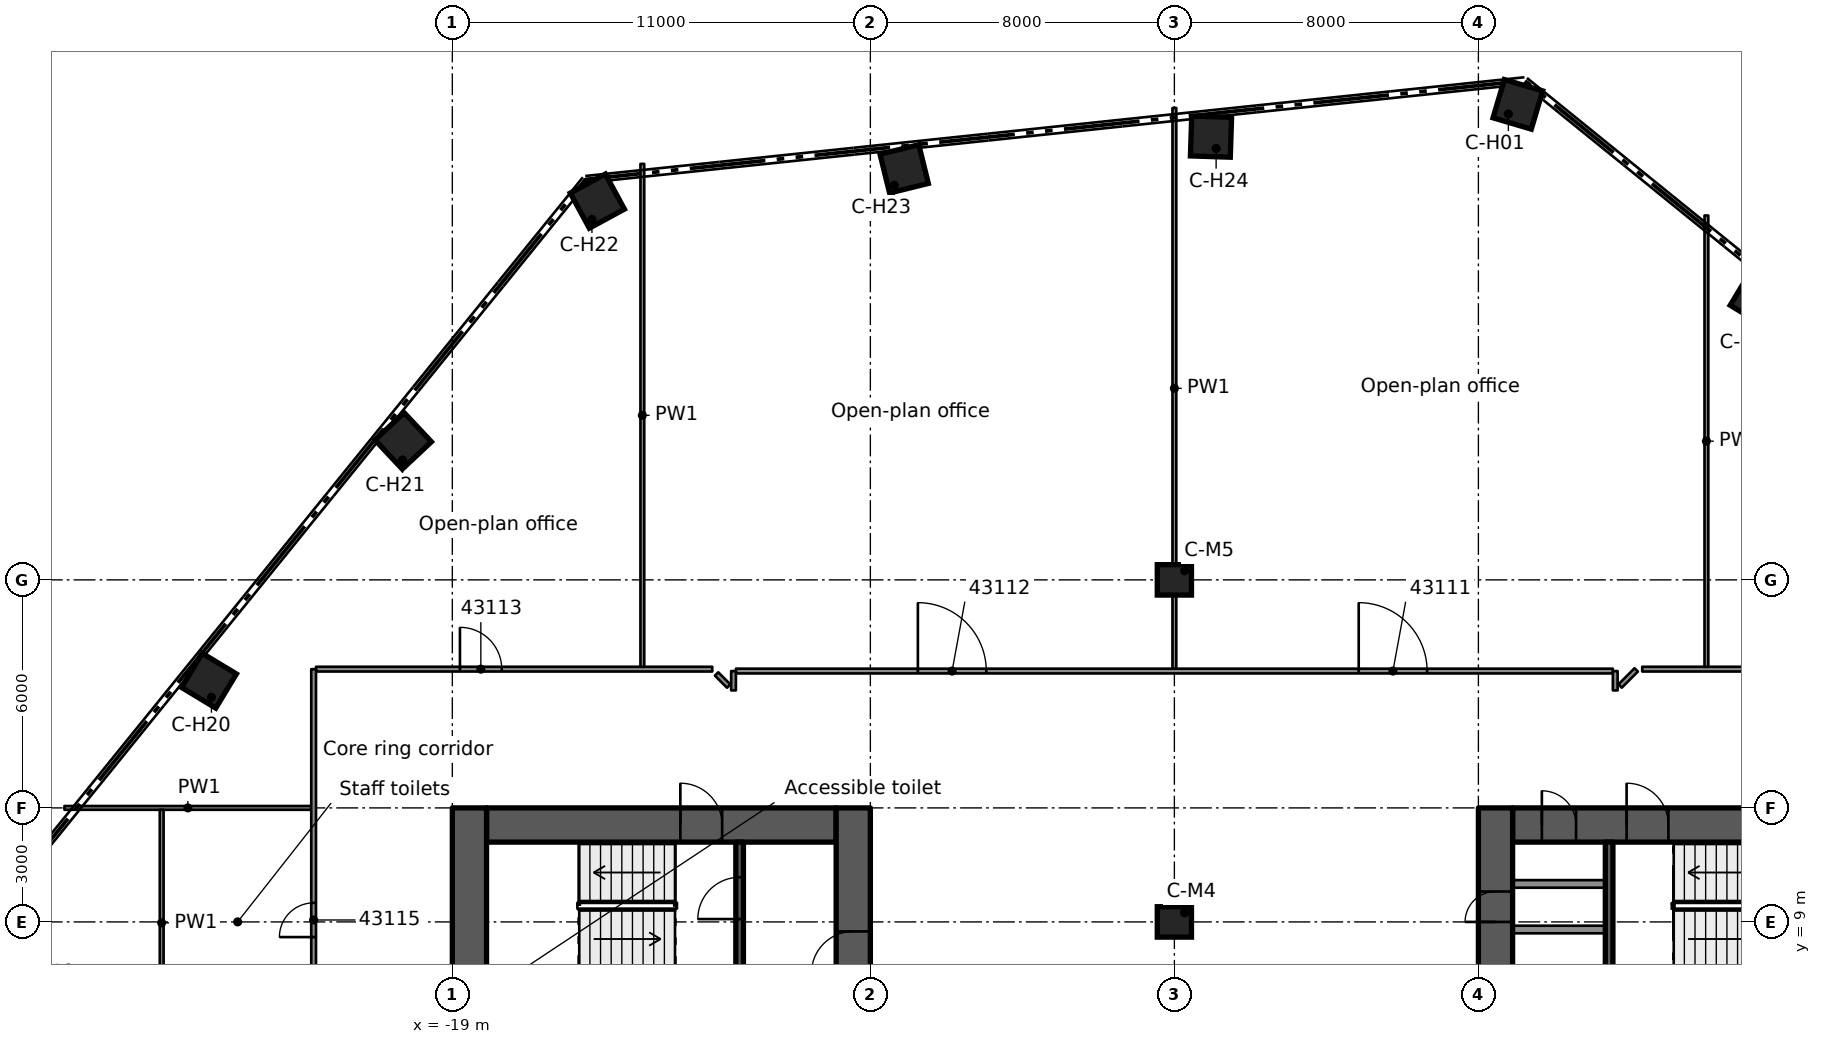
"""IFC4 building model, lengths in metres.
Left out: names, types, materials, properties, quantities, classifications, styles, units other than length and angle.
Written with IfcOpenShell. Run it as: python <this file> out.ifc"""

import sys

from ifc_helpers import new_model, si_unit, direction, frame, frame_2d, origin, origin_2d, place, context, subcontext, project, spatial, rectangle, extrude, element, fill, save


model = new_model("IFC4")
c1 = context("Model", 3, precision=1e-05, world=origin(), true_north=direction((0.0, 1.0)))
c2 = subcontext(c1, "Body", "Model", "MODEL_VIEW")
j1 = project(units=[si_unit("LENGTHUNIT", "METRE"), si_unit("PLANEANGLEUNIT", "RADIAN")], contexts=[c1])
p1 = place(None, origin())
s1 = spatial("IfcSite", under=j1, at=p1, CompositionType="ELEMENT")
p2 = place(p1, origin())
s2 = spatial("IfcBuilding", under=s1, at=p2, CompositionType="ELEMENT")
p3 = place(p2, frame((0.0, 0.0, 214.0)))
s3 = spatial("IfcBuildingStorey", under=s2, at=p3, CompositionType="ELEMENT", Elevation=214.0)
p4 = place(p3, frame((-18.1, 11.55, 0.0), z_axis=(0.0, 0.0, 1.0), x_axis=(1.0, 0.0, 0.0)))
e1 = element("IfcWall", 1, at=p4, inside=s3, PredefinedType="SHEAR", context=c2, shape_type="SweptSolid", body=[
    extrude(rectangle(XDim=9.2, YDim=0.9, at=frame_2d((4.6, 0.0))), origin(), (0.0, 0.0, 1.0), 3.5),
])
p5 = place(p4, frame((5.1, 0.0, 0.0)))
e2 = element("IfcOpeningElement", 2, at=p5, cuts=e1, PredefinedType="OPENING", context=c2, shape_type="SweptSolid", body=[
    extrude(rectangle(XDim=1.1, YDim=2.1, at=frame_2d((0.55, 1.05))), frame((0.0, 0.46, 0.0), z_axis=(0.0, -1.0, 0.0), x_axis=(1.0, 0.0, 0.0)), (0.0, 0.0, 1.0), 0.92),
])
p6 = place(p3, frame((-18.55, -12.0, 0.0), z_axis=(0.0, 0.0, 1.0), x_axis=(0.0, 1.0, 0.0)))
e3 = element("IfcWall", 3, at=p6, inside=s3, PredefinedType="SHEAR", context=c2, shape_type="SweptSolid", body=[
    extrude(rectangle(XDim=24.0, YDim=0.9, at=frame_2d((12.0, 0.0))), origin(), (0.0, 0.0, 1.0), 3.5),
])
p7 = place(p6, frame((10.1, 0.0, 0.0)))
e4 = element("IfcOpeningElement", 4, at=p7, cuts=e3, PredefinedType="OPENING", context=c2, shape_type="SweptSolid", body=[
    extrude(rectangle(XDim=1.8, YDim=2.1, at=frame_2d((0.9, 1.05))), frame((0.0, 0.46, 0.0), z_axis=(0.0, -1.0, 0.0), x_axis=(1.0, 0.0, 0.0)), (0.0, 0.0, 1.0), 0.92),
])
p8 = place(p3, frame((-8.45, -12.0, 0.0), z_axis=(0.0, 0.0, 1.0), x_axis=(0.0, 1.0, 0.0)))
e5 = element("IfcWall", 5, at=p8, inside=s3, PredefinedType="SHEAR", context=c2, shape_type="SweptSolid", body=[
    extrude(rectangle(XDim=24.0, YDim=0.9, at=frame_2d((12.0, 0.0))), origin(), (0.0, 0.0, 1.0), 3.5),
])
p9 = place(p8, frame((9.6, 0.0, 0.0)))
e6 = element("IfcOpeningElement", 6, at=p9, cuts=e5, PredefinedType="OPENING", context=c2, shape_type="SweptSolid", body=[
    extrude(rectangle(XDim=1.8, YDim=2.1, at=frame_2d((0.9, 1.05))), frame((0.0, 0.46, 0.0), z_axis=(0.0, -1.0, 0.0), x_axis=(1.0, 0.0, 0.0)), (0.0, 0.0, 1.0), 0.92),
])
p10 = place(p8, frame((19.65, 0.0, 0.0)))
e7 = element("IfcOpeningElement", 7, at=p10, cuts=e5, PredefinedType="OPENING", context=c2, shape_type="SweptSolid", body=[
    extrude(rectangle(XDim=1.1, YDim=2.1, at=frame_2d((0.55, 1.05))), frame((0.0, 0.46, 0.0), z_axis=(0.0, -1.0, 0.0), x_axis=(1.0, 0.0, 0.0)), (0.0, 0.0, 1.0), 0.92),
])
p11 = place(p8, frame((2.2, 0.0, 0.0)))
e8 = element("IfcOpeningElement", 8, at=p11, cuts=e5, PredefinedType="OPENING", context=c2, shape_type="SweptSolid", body=[
    extrude(rectangle(XDim=0.8, YDim=2.1, at=frame_2d((0.4, 1.05))), frame((0.0, 0.46, 0.0), z_axis=(0.0, -1.0, 0.0), x_axis=(1.0, 0.0, 0.0)), (0.0, 0.0, 1.0), 0.92),
])
p12 = place(p3, frame((8.9, 11.55, 0.0), z_axis=(0.0, 0.0, 1.0), x_axis=(1.0, 0.0, 0.0)))
e9 = element("IfcWall", 9, at=p12, inside=s3, PredefinedType="SHEAR", context=c2, shape_type="SweptSolid", body=[
    extrude(rectangle(XDim=9.2, YDim=0.9, at=frame_2d((4.6, 0.0))), origin(), (0.0, 0.0, 1.0), 3.5),
])
p13 = place(p12, frame((3.0, 0.0, 0.0)))
e10 = element("IfcOpeningElement", 10, at=p13, cuts=e9, PredefinedType="OPENING", context=c2, shape_type="SweptSolid", body=[
    extrude(rectangle(XDim=1.1, YDim=2.1, at=frame_2d((0.55, 1.05))), frame((0.0, 0.46, 0.0), z_axis=(0.0, -1.0, 0.0), x_axis=(1.0, 0.0, 0.0)), (0.0, 0.0, 1.0), 0.92),
])
p14 = place(p12, frame((0.77, 0.0, 0.0)))
e11 = element("IfcOpeningElement", 11, at=p14, cuts=e9, PredefinedType="OPENING", context=c2, shape_type="SweptSolid", body=[
    extrude(rectangle(XDim=0.9, YDim=2.1, at=frame_2d((0.45, 1.05))), frame((0.0, 0.46, 0.0), z_axis=(0.0, -1.0, 0.0), x_axis=(1.0, 0.0, 0.0)), (0.0, 0.0, 1.0), 0.92),
])
p15 = place(p3, frame((8.45, -12.0, 0.0), z_axis=(0.0, 0.0, 1.0), x_axis=(0.0, 1.0, 0.0)))
e12 = element("IfcWall", 12, at=p15, inside=s3, PredefinedType="SHEAR", context=c2, shape_type="SweptSolid", body=[
    extrude(rectangle(XDim=24.0, YDim=0.9, at=frame_2d((12.0, 0.0))), origin(), (0.0, 0.0, 1.0), 3.5),
])
p16 = place(p15, frame((12.6, 0.0, 0.0)))
e13 = element("IfcOpeningElement", 13, at=p16, cuts=e12, PredefinedType="OPENING", context=c2, shape_type="SweptSolid", body=[
    extrude(rectangle(XDim=1.8, YDim=2.1, at=frame_2d((0.9, 1.05))), frame((0.0, 0.46, 0.0), z_axis=(0.0, -1.0, 0.0), x_axis=(1.0, 0.0, 0.0)), (0.0, 0.0, 1.0), 0.92),
])
p17 = place(p15, frame((3.25, 0.0, 0.0)))
e14 = element("IfcOpeningElement", 14, at=p17, cuts=e12, PredefinedType="OPENING", context=c2, shape_type="SweptSolid", body=[
    extrude(rectangle(XDim=1.1, YDim=2.1, at=frame_2d((0.55, 1.05))), frame((0.0, 0.46, 0.0), z_axis=(0.0, -1.0, 0.0), x_axis=(1.0, 0.0, 0.0)), (0.0, 0.0, 1.0), 0.92),
])
p18 = place(p15, frame((21.0, 0.0, 0.0)))
e15 = element("IfcOpeningElement", 15, at=p18, cuts=e12, PredefinedType="OPENING", context=c2, shape_type="SweptSolid", body=[
    extrude(rectangle(XDim=0.8, YDim=2.1, at=frame_2d((0.4, 1.05))), frame((0.0, 0.46, 0.0), z_axis=(0.0, -1.0, 0.0), x_axis=(1.0, 0.0, 0.0)), (0.0, 0.0, 1.0), 0.92),
])
for number, where, z_axis, x_axis in (
    (16, (9.038, 30.512, 0.0), (0.0, 0.0, 1.0), (0.284, 0.959, 0.0)),
    (17, (15.347, 25.403, 0.0), (0.0, 0.0, 1.0), (0.517, 0.856, 0.0)),
    (18, (-25.403, 15.347, 0.0), (0.0, 0.0, 1.0), (-0.856, 0.517, 0.0)),
    (19, (-20.293, 21.657, 0.0), (0.0, 0.0, 1.0), (-0.684, 0.73, 0.0)),
    (20, (-15.184, 27.966, 0.0), (0.0, 0.0, 1.0), (-0.477, 0.879, 0.0)),
    (21, (-7.11, 28.815, 0.0), (0.0, 0.0, 1.0), (-0.24, 0.971, 0.0)),
    (22, (0.964, 29.663, 0.0), (0.0, 0.0, 1.0), (0.032, 0.999, 0.0)),
):
    element("IfcColumn", number, at=place(p3, frame(where, z_axis=z_axis, x_axis=x_axis)), inside=s3, PredefinedType="COLUMN", context=c2, shape_type="SweptSolid", body=[
        extrude(rectangle(XDim=1.05, YDim=1.05, at=origin_2d()), origin(), (0.0, 0.0, 1.0), 3.5),
    ])
for number, where, z_axis, x_axis in (
    (23, (0.0, 9.0, 0.0), (0.0, 0.0, 1.0), (1.0, 0.0, 0.0)),
    (24, (0.0, 18.0, 0.0), (0.0, 0.0, 1.0), (1.0, 0.0, 0.0)),
):
    element("IfcColumn", number, at=place(p3, frame(where, z_axis=z_axis, x_axis=x_axis)), inside=s3, PredefinedType="COLUMN", context=c2, shape_type="SweptSolid", body=[
        extrude(rectangle(XDim=0.9, YDim=0.8, at=origin_2d()), origin(), (0.0, 0.0, 1.0), 3.5),
    ])
p19 = place(p3, frame((-11.44, 6.975, 0.0), z_axis=(0.0, 0.0, 1.0), x_axis=(0.0, 1.0, 0.0)))
e25 = element("IfcWall", 25, at=p19, inside=s3, PredefinedType="SOLIDWALL", context=c2, shape_type="SweptSolid", body=[
    extrude(rectangle(XDim=4.125, YDim=0.2, at=frame_2d((2.062, 0.0))), origin(), (0.0, 0.0, 1.0), 3.08),
])
p20 = place(p19, frame((2.1, 0.0, 0.0)))
e26 = element("IfcOpeningElement", 26, at=p20, cuts=e25, PredefinedType="OPENING", context=c2, shape_type="SweptSolid", body=[
    extrude(rectangle(XDim=1.1, YDim=2.1, at=frame_2d((0.55, 1.05))), frame((0.0, 0.11, 0.0), z_axis=(0.0, -1.0, 0.0), x_axis=(1.0, 0.0, 0.0)), (0.0, 0.0, 1.0), 0.22),
])
p21 = place(p3, frame((11.44, 11.1, 0.0), z_axis=(0.0, 0.0, 1.0), x_axis=(0.0, -1.0, 0.0)))
e27 = element("IfcWall", 27, at=p21, inside=s3, PredefinedType="SOLIDWALL", context=c2, shape_type="SweptSolid", body=[
    extrude(rectangle(XDim=4.125, YDim=0.2, at=frame_2d((2.062, 0.0))), origin(), (0.0, 0.0, 1.0), 3.08),
])
for number, where, z_axis, x_axis in (
    (28, (8.9, 10.0, 0.0), (0.0, 0.0, 1.0), (1.0, 0.0, 0.0)),
    (29, (8.9, 8.8, 0.0), (0.0, 0.0, 1.0), (1.0, 0.0, 0.0)),
):
    element("IfcWall", number, at=place(p3, frame(where, z_axis=z_axis, x_axis=x_axis)), inside=s3, PredefinedType="PARTITIONING", context=c2, shape_type="SweptSolid", body=[
        extrude(rectangle(XDim=2.44, YDim=0.2, at=frame_2d((1.22, 0.0))), origin(), (0.0, 0.0, 1.0), 3.08),
    ])
p22 = place(p3, frame((-12.046, 15.524, 0.0), z_axis=(0.0, 0.0, 1.0), x_axis=(0.707106781187, -0.707106781187, 0.0)))
e30 = element("IfcWall", 30, at=p22, inside=s3, PredefinedType="PARTITIONING", context=c2, shape_type="SweptSolid", body=[
    extrude(rectangle(XDim=0.449, YDim=0.125, at=frame_2d((0.225, 0.0))), origin(), (0.0, 0.0, 1.0), 3.06),
])
p23 = place(p3, frame((-29.207, 12.0, 0.0), z_axis=(0.0, 0.0, 1.0), x_axis=(1.0, 0.0, 0.0)))
e31 = element("IfcWall", 31, at=p23, inside=s3, PredefinedType="PARTITIONING", context=c2, shape_type="SweptSolid", body=[
    extrude(rectangle(XDim=6.495, YDim=0.1, at=frame_2d((3.248, 0.0))), origin(), (0.0, 0.0, 1.0), 3.06),
])
p24 = place(p3, frame((-11.537, 15.601, 0.0), z_axis=(0.0, 0.0, 1.0), x_axis=(1.0, 0.0, 0.0)))
e32 = element("IfcWall", 32, at=p24, inside=s3, PredefinedType="PARTITIONING", context=c2, shape_type="SweptSolid", body=[
    extrude(rectangle(XDim=23.074, YDim=0.125, at=frame_2d((11.537, 0.0))), origin(), (0.0, 0.0, 1.0), 3.06),
])
p25 = place(p24, frame((16.387, 0.0, 0.0)))
e33 = element("IfcOpeningElement", 33, at=p25, cuts=e32, PredefinedType="OPENING", context=c2, shape_type="SweptSolid", body=[
    extrude(rectangle(XDim=1.8, YDim=2.1, at=frame_2d((0.9, 1.05))), frame((0.0, 0.073, 0.0), z_axis=(0.0, -1.0, 0.0), x_axis=(1.0, 0.0, 0.0)), (0.0, 0.0, 1.0), 0.145),
])
p26 = place(p24, frame((4.788, 0.0, 0.0)))
e34 = element("IfcOpeningElement", 34, at=p26, cuts=e32, PredefinedType="OPENING", context=c2, shape_type="SweptSolid", body=[
    extrude(rectangle(XDim=1.8, YDim=2.1, at=frame_2d((0.9, 1.05))), frame((0.0, 0.073, 0.0), z_axis=(0.0, -1.0, 0.0), x_axis=(1.0, 0.0, 0.0)), (0.0, 0.0, 1.0), 0.145),
])
p27 = place(p3, frame((-22.587, 15.651, 0.0), z_axis=(0.0, 0.0, 1.0), x_axis=(1.0, 0.0, 0.0)))
e35 = element("IfcWall", 35, at=p27, inside=s3, PredefinedType="PARTITIONING", context=c2, shape_type="SweptSolid", body=[
    extrude(rectangle(XDim=10.427, YDim=0.125, at=frame_2d((5.213, 0.0))), origin(), (0.0, 0.0, 1.0), 3.06),
])
p28 = place(p27, frame((3.788, 0.0, 0.0)))
e36 = element("IfcOpeningElement", 36, at=p28, cuts=e35, PredefinedType="OPENING", context=c2, shape_type="SweptSolid", body=[
    extrude(rectangle(XDim=1.1, YDim=2.1, at=frame_2d((0.55, 1.05))), frame((0.0, 0.073, 0.0), z_axis=(0.0, -1.0, 0.0), x_axis=(1.0, 0.0, 0.0)), (0.0, 0.0, 1.0), 0.145),
])
p29 = place(p3, frame((12.311, 15.651, 0.0), z_axis=(0.0, 0.0, 1.0), x_axis=(1.0, 0.0, 0.0)))
e37 = element("IfcWall", 37, at=p29, inside=s3, PredefinedType="PARTITIONING", context=c2, shape_type="SweptSolid", body=[
    extrude(rectangle(XDim=10.276, YDim=0.125, at=frame_2d((5.138, 0.0))), origin(), (0.0, 0.0, 1.0), 3.06),
])
p30 = place(p29, frame((5.039, 0.0, 0.0)))
e38 = element("IfcOpeningElement", 38, at=p30, cuts=e37, PredefinedType="OPENING", context=c2, shape_type="SweptSolid", body=[
    extrude(rectangle(XDim=1.8, YDim=2.1, at=frame_2d((0.9, 1.05))), frame((0.0, 0.073, 0.0), z_axis=(0.0, -1.0, 0.0), x_axis=(1.0, 0.0, 0.0)), (0.0, 0.0, 1.0), 0.145),
])
p31 = place(p3, frame((11.729, 15.207, 0.0), z_axis=(0.0, 0.0, 1.0), x_axis=(0.707106781187, 0.707106781187, 0.0)))
e39 = element("IfcWall", 39, at=p31, inside=s3, PredefinedType="PARTITIONING", context=c2, shape_type="SweptSolid", body=[
    extrude(rectangle(XDim=0.6, YDim=0.125, at=frame_2d((0.3, 0.0))), origin(), (0.0, 0.0, 1.0), 3.06),
])
p32 = place(p3, frame((-11.601, 15.092, 0.0), z_axis=(0.0, 0.0, 1.0), x_axis=(0.00192214926, 0.999998152669, 0.0)))
e40 = element("IfcWall", 40, at=p32, inside=s3, PredefinedType="PARTITIONING", context=c2, shape_type="SweptSolid", body=[
    extrude(rectangle(XDim=0.508, YDim=0.125, at=frame_2d((0.254, 0.0))), origin(), (0.0, 0.0, 1.0), 3.06),
])
p33 = place(p3, frame((14.0, 15.713, 0.0), z_axis=(0.0, 0.0, 1.0), x_axis=(0.0, 1.0, 0.0)))
e41 = element("IfcWall", 41, at=p33, inside=s3, PredefinedType="PARTITIONING", context=c2, shape_type="SweptSolid", body=[
    extrude(rectangle(XDim=11.874, YDim=0.1, at=frame_2d((5.937, 0.0))), origin(), (0.0, 0.0, 1.0), 3.06),
])
p34 = place(p3, frame((11.601, 15.092, 0.0), z_axis=(0.0, 0.0, 1.0), x_axis=(0.0, 1.0, 0.0)))
e42 = element("IfcWall", 42, at=p34, inside=s3, PredefinedType="PARTITIONING", context=c2, shape_type="SweptSolid", body=[
    extrude(rectangle(XDim=0.508, YDim=0.125, at=frame_2d((0.254, 0.0))), origin(), (0.0, 0.0, 1.0), 3.06),
])
p35 = place(p3, frame((0.0, 15.664, 0.0), z_axis=(0.0, 0.0, 1.0), x_axis=(0.0, 1.0, 0.0)))
e43 = element("IfcWall", 43, at=p35, inside=s3, PredefinedType="PARTITIONING", context=c2, shape_type="SweptSolid", body=[
    extrude(rectangle(XDim=14.753, YDim=0.1, at=frame_2d((7.376, 0.0))), origin(), (0.0, 0.0, 1.0), 3.06),
])
p36 = place(p3, frame((-14.0, 15.713, 0.0), z_axis=(0.0, 0.0, 1.0), x_axis=(0.0, 1.0, 0.0)))
e44 = element("IfcWall", 44, at=p36, inside=s3, PredefinedType="PARTITIONING", context=c2, shape_type="SweptSolid", body=[
    extrude(rectangle(XDim=13.233, YDim=0.1, at=frame_2d((6.617, 0.0))), origin(), (0.0, 0.0, 1.0), 3.06),
])
p37 = place(p3, frame((-22.65, -15.651, 0.0), z_axis=(0.0, 0.0, 1.0), x_axis=(0.0, 1.0, 0.0)))
e45 = element("IfcWall", 45, at=p37, inside=s3, PredefinedType="PARTITIONING", context=c2, shape_type="SweptSolid", body=[
    extrude(rectangle(XDim=31.302, YDim=0.125, at=frame_2d((15.651, 0.0))), origin(), (0.0, 0.0, 1.0), 3.06),
])
p38 = place(p37, frame((0.85, 0.0, 0.0)))
e46 = element("IfcOpeningElement", 46, at=p38, cuts=e45, PredefinedType="OPENING", context=c2, shape_type="SweptSolid", body=[
    extrude(rectangle(XDim=1.8, YDim=2.1, at=frame_2d((0.9, 1.05))), frame((0.0, 0.073, 0.0), z_axis=(0.0, -1.0, 0.0), x_axis=(1.0, 0.0, 0.0)), (0.0, 0.0, 1.0), 0.145),
])
p39 = place(p37, frame((8.751, 0.0, 0.0)))
e47 = element("IfcOpeningElement", 47, at=p39, cuts=e45, PredefinedType="OPENING", context=c2, shape_type="SweptSolid", body=[
    extrude(rectangle(XDim=1.8, YDim=2.1, at=frame_2d((0.9, 1.05))), frame((0.0, 0.073, 0.0), z_axis=(0.0, -1.0, 0.0), x_axis=(1.0, 0.0, 0.0)), (0.0, 0.0, 1.0), 0.145),
])
p40 = place(p37, frame((24.252, 0.0, 0.0)))
e48 = element("IfcOpeningElement", 48, at=p40, cuts=e45, PredefinedType="OPENING", context=c2, shape_type="SweptSolid", body=[
    extrude(rectangle(XDim=0.9, YDim=2.1, at=frame_2d((0.45, 1.05))), frame((0.0, 0.073, 0.0), z_axis=(0.0, -1.0, 0.0), x_axis=(1.0, 0.0, 0.0)), (0.0, 0.0, 1.0), 0.145),
])
p41 = place(p37, frame((18.003, 0.0, 0.0)))
e49 = element("IfcOpeningElement", 49, at=p41, cuts=e45, PredefinedType="OPENING", context=c2, shape_type="SweptSolid", body=[
    extrude(rectangle(XDim=1.1, YDim=2.1, at=frame_2d((0.55, 1.05))), frame((0.0, 0.073, 0.0), z_axis=(0.0, -1.0, 0.0), x_axis=(1.0, 0.0, 0.0)), (0.0, 0.0, 1.0), 0.145),
])
p42 = place(p3, frame((-26.648, 6.001, 0.0), z_axis=(0.0, 0.0, 1.0), x_axis=(0.0, 1.0, 0.0)))
e50 = element("IfcWall", 50, at=p42, inside=s3, PredefinedType="PARTITIONING", context=c2, shape_type="SweptSolid", body=[
    extrude(rectangle(XDim=5.949, YDim=0.1, at=frame_2d((2.975, 0.0))), origin(), (0.0, 0.0, 1.0), 3.06),
])
p43 = place(p10, origin())
e51 = element("IfcDoor", 51, at=p43, inside=s3, OperationType="SINGLE_SWING_RIGHT", PredefinedType="DOOR", context=c2, shape_type="SweptSolid", body=[
    extrude(rectangle(XDim=1.1, YDim=2.1, at=frame_2d((0.55, 1.05))), frame((0.0, 0.025, 0.0), z_axis=(0.0, -1.0, 0.0), x_axis=(1.0, 0.0, 0.0)), (0.0, 0.0, 1.0), 0.05),
])
fill(e7, e51)
p44 = place(p5, origin())
e52 = element("IfcDoor", 52, at=p44, inside=s3, OperationType="SINGLE_SWING_RIGHT", PredefinedType="DOOR", context=c2, shape_type="SweptSolid", body=[
    extrude(rectangle(XDim=1.1, YDim=2.1, at=frame_2d((0.55, 1.05))), frame((0.0, 0.025, 0.0), z_axis=(0.0, -1.0, 0.0), x_axis=(1.0, 0.0, 0.0)), (0.0, 0.0, 1.0), 0.05),
])
fill(e2, e52)
p45 = place(p20, origin())
e53 = element("IfcDoor", 53, at=p45, inside=s3, OperationType="SINGLE_SWING_RIGHT", PredefinedType="DOOR", context=c2, shape_type="SweptSolid", body=[
    extrude(rectangle(XDim=1.1, YDim=2.1, at=frame_2d((0.55, 1.05))), frame((0.0, 0.025, 0.0), z_axis=(0.0, -1.0, 0.0), x_axis=(1.0, 0.0, 0.0)), (0.0, 0.0, 1.0), 0.05),
])
fill(e26, e53)
p46 = place(p13, origin())
e54 = element("IfcDoor", 54, at=p46, inside=s3, OperationType="SINGLE_SWING_LEFT", PredefinedType="DOOR", context=c2, shape_type="SweptSolid", body=[
    extrude(rectangle(XDim=1.1, YDim=2.1, at=frame_2d((0.55, 1.05))), frame((0.0, 0.025, 0.0), z_axis=(0.0, -1.0, 0.0), x_axis=(1.0, 0.0, 0.0)), (0.0, 0.0, 1.0), 0.05),
])
fill(e10, e54)
p47 = place(p14, origin())
e55 = element("IfcDoor", 55, at=p47, inside=s3, OperationType="SINGLE_SWING_LEFT", PredefinedType="DOOR", context=c2, shape_type="SweptSolid", body=[
    extrude(rectangle(XDim=0.9, YDim=2.1, at=frame_2d((0.45, 1.05))), frame((0.0, 0.025, 0.0), z_axis=(0.0, -1.0, 0.0), x_axis=(1.0, 0.0, 0.0)), (0.0, 0.0, 1.0), 0.05),
])
fill(e11, e55)
p48 = place(p18, origin())
e56 = element("IfcDoor", 56, at=p48, inside=s3, OperationType="SINGLE_SWING_RIGHT", PredefinedType="DOOR", context=c2, shape_type="SweptSolid", body=[
    extrude(rectangle(XDim=0.8, YDim=2.1, at=frame_2d((0.4, 1.05))), frame((0.0, 0.025, 0.0), z_axis=(0.0, -1.0, 0.0), x_axis=(1.0, 0.0, 0.0)), (0.0, 0.0, 1.0), 0.05),
])
fill(e15, e56)
p49 = place(p25, origin())
e57 = element("IfcDoor", 57, at=p49, inside=s3, OperationType="DOUBLE_DOOR_SINGLE_SWING", PredefinedType="DOOR", context=c2, shape_type="SweptSolid", body=[
    extrude(rectangle(XDim=1.8, YDim=2.1, at=frame_2d((0.9, 1.05))), frame((0.0, 0.025, 0.0), z_axis=(0.0, -1.0, 0.0), x_axis=(1.0, 0.0, 0.0)), (0.0, 0.0, 1.0), 0.05),
])
fill(e33, e57)
p50 = place(p26, origin())
e58 = element("IfcDoor", 58, at=p50, inside=s3, OperationType="DOUBLE_DOOR_SINGLE_SWING", PredefinedType="DOOR", context=c2, shape_type="SweptSolid", body=[
    extrude(rectangle(XDim=1.8, YDim=2.1, at=frame_2d((0.9, 1.05))), frame((0.0, 0.025, 0.0), z_axis=(0.0, -1.0, 0.0), x_axis=(1.0, 0.0, 0.0)), (0.0, 0.0, 1.0), 0.05),
])
fill(e34, e58)
p51 = place(p28, origin())
e59 = element("IfcDoor", 59, at=p51, inside=s3, OperationType="SINGLE_SWING_LEFT", PredefinedType="DOOR", context=c2, shape_type="SweptSolid", body=[
    extrude(rectangle(XDim=1.1, YDim=2.1, at=frame_2d((0.55, 1.05))), frame((0.0, 0.025, 0.0), z_axis=(0.0, -1.0, 0.0), x_axis=(1.0, 0.0, 0.0)), (0.0, 0.0, 1.0), 0.05),
])
fill(e36, e59)
p52 = place(p40, origin())
e60 = element("IfcDoor", 60, at=p52, inside=s3, OperationType="SINGLE_SWING_RIGHT", PredefinedType="DOOR", context=c2, shape_type="SweptSolid", body=[
    extrude(rectangle(XDim=0.9, YDim=2.1, at=frame_2d((0.45, 1.05))), frame((0.0, 0.025, 0.0), z_axis=(0.0, -1.0, 0.0), x_axis=(1.0, 0.0, 0.0)), (0.0, 0.0, 1.0), 0.05),
])
fill(e48, e60)
save(model, sys.argv[1])
